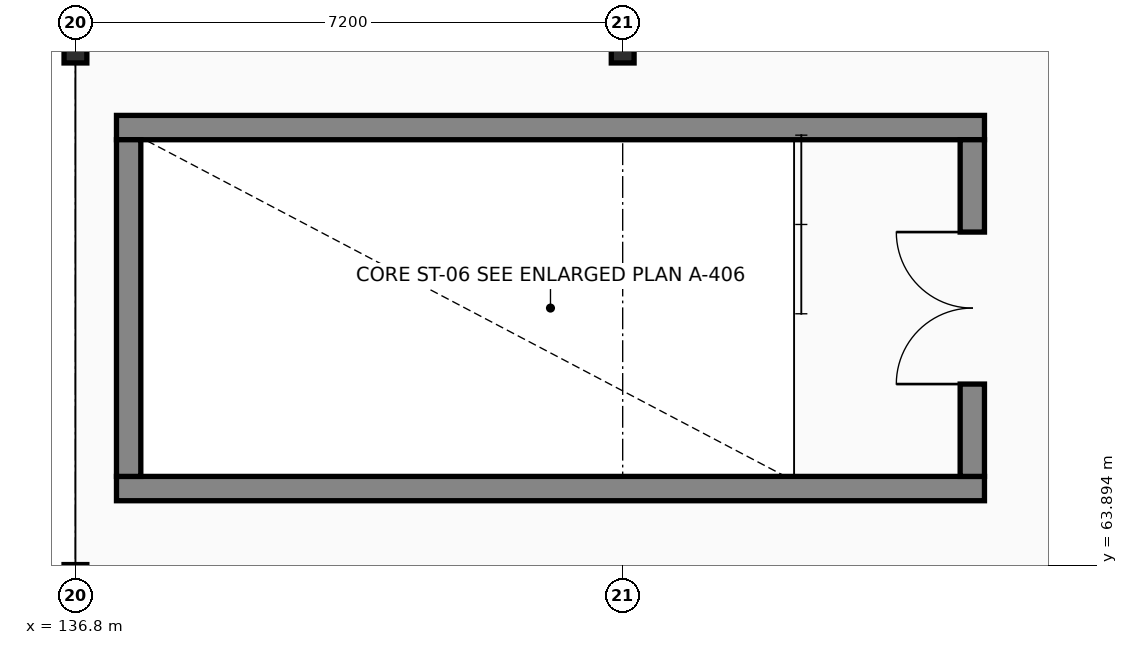
"""IFC4 building model, lengths in metres.
Left out: names, types, materials, properties, quantities, classifications, styles, units other than length and angle.
Written with IfcOpenShell. Run it as: python <this file> out.ifc"""

import sys

from ifc_helpers import new_model, si_unit, direction, frame, frame_2d, origin, origin_2d, place, context, subcontext, project, spatial, rectangle, i_section, extrude, element, fill, save


model = new_model("IFC4")
c1 = context("Model", 3, precision=1e-05, world=origin(), true_north=direction((0.0, 1.0)))
c2 = subcontext(c1, "Body", "Model", "MODEL_VIEW")
j1 = project(units=[si_unit("LENGTHUNIT", "METRE"), si_unit("PLANEANGLEUNIT", "RADIAN")], contexts=[c1])
p1 = place(None, origin())
s1 = spatial("IfcSite", under=j1, at=p1, CompositionType="ELEMENT")
p2 = place(p1, origin())
s2 = spatial("IfcBuilding", under=s1, at=p2, CompositionType="ELEMENT")
p3 = place(p2, frame((0.0, 0.0, 9.6)))
s3 = spatial("IfcBuildingStorey", under=s2, at=p3, CompositionType="ELEMENT", Elevation=9.6)
for number, where, z_axis, x_axis in (
    (1, (136.8, 63.6, 0.0), (0.0, 0.0, 1.0), (1.0, 0.0, 0.0)),
    (2, (136.8, 70.8, 0.0), (0.0, 0.0, 1.0), (1.0, 0.0, 0.0)),
    (3, (144.0, 70.8, 0.0), (0.0, 0.0, 1.0), (1.0, 0.0, 0.0)),
):
    element("IfcColumn", number, at=place(p3, frame(where, z_axis=z_axis, x_axis=x_axis)), inside=s3, PredefinedType="COLUMN", context=c2, shape_type="SweptSolid", body=[
        extrude(i_section(OverallWidth=0.3, OverallDepth=0.6, WebThickness=0.015, FlangeThickness=0.03, at=origin_2d()), origin(), (0.0, 0.0, 1.0), 4.8),
    ])
for number, where, z_axis, x_axis in (
    (4, (137.34, 64.9, 0.0), (0.0, 0.0, 1.0), (1.0, 0.0, 0.0)),
    (5, (137.34, 69.65, 0.0), (0.0, 0.0, 1.0), (1.0, 0.0, 0.0)),
):
    element("IfcWall", number, at=place(p3, frame(where, z_axis=z_axis, x_axis=x_axis)), inside=s3, PredefinedType="SHEAR", context=c2, shape_type="SweptSolid", body=[
        extrude(rectangle(XDim=11.42, YDim=0.32, at=frame_2d((5.71, 0.0))), origin(), (0.0, 0.0, 1.0), 4.56),
    ])
p4 = place(p3, frame((137.5, 65.06, 0.0), z_axis=(0.0, 0.0, 1.0), x_axis=(0.0, 1.0, 0.0)))
e6 = element("IfcWall", 6, at=p4, inside=s3, PredefinedType="SHEAR", context=c2, shape_type="SweptSolid", body=[
    extrude(rectangle(XDim=4.43, YDim=0.32, at=frame_2d((2.215, 0.0))), origin(), (0.0, 0.0, 1.0), 4.56),
])
p5 = place(p3, frame((148.6, 65.06, 0.0), z_axis=(0.0, 0.0, 1.0), x_axis=(0.0, 1.0, 0.0)))
e7 = element("IfcWall", 7, at=p5, inside=s3, PredefinedType="SHEAR", context=c2, shape_type="SweptSolid", body=[
    extrude(rectangle(XDim=4.43, YDim=0.32, at=frame_2d((2.215, 0.0))), origin(), (0.0, 0.0, 1.0), 4.56),
])
p6 = place(p5, frame((1.215, 0.0, 0.0)))
e8 = element("IfcOpeningElement", 8, at=p6, cuts=e7, PredefinedType="OPENING", context=c2, shape_type="SweptSolid", body=[
    extrude(rectangle(XDim=2.0, YDim=2.15, at=frame_2d((1.0, 1.075))), frame((0.0, 0.17, 0.0), z_axis=(0.0, -1.0, 0.0), x_axis=(1.0, 0.0, 0.0)), (0.0, 0.0, 1.0), 0.34),
])
p7 = place(p6, origin())
e9 = element("IfcDoor", 9, at=p7, inside=s3, OperationType="DOUBLE_DOOR_SINGLE_SWING", PredefinedType="DOOR", context=c2, shape_type="SweptSolid", body=[
    extrude(rectangle(XDim=2.0, YDim=2.15, at=frame_2d((1.0, 1.075))), frame((0.0, 0.025, 0.0), z_axis=(0.0, -1.0, 0.0), x_axis=(1.0, 0.0, 0.0)), (0.0, 0.0, 1.0), 0.05),
])
fill(e8, e9)
save(model, sys.argv[1])
